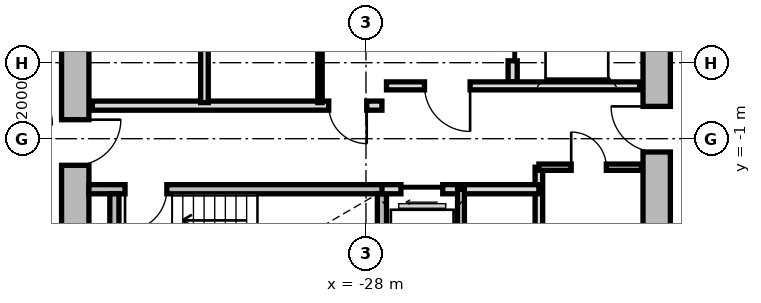
"""IFC4 building model, lengths in metres.
Left out: names, types, materials, properties, quantities, classifications, styles, units other than length and angle.
Written with IfcOpenShell. Run it as: python <this file> out.ifc"""

import sys

from ifc_helpers import new_model, si_unit, direction, frame, frame_2d, origin, place, context, subcontext, project, spatial, rectangle, extrude, source, transform, mapped, element, fill, save


model = new_model("IFC4")
c1 = context("Model", 3, precision=1e-05, world=origin(), true_north=direction((0.0, 1.0)))
c2 = subcontext(c1, "Body", "Model", "MODEL_VIEW")
j1 = project(units=[si_unit("LENGTHUNIT", "METRE"), si_unit("PLANEANGLEUNIT", "RADIAN")], contexts=[c1])
p1 = place(None, origin())
s1 = spatial("IfcSite", under=j1, at=p1, CompositionType="ELEMENT")
p2 = place(p1, origin())
s2 = spatial("IfcBuilding", under=s1, at=p2, CompositionType="ELEMENT")
p3 = place(p2, frame((0.0, 0.0, 81.0)))
s3 = spatial("IfcBuildingStorey", under=s2, at=p3, CompositionType="ELEMENT", Elevation=81.0)
m1 = source(origin(), c2, "Body", "SweptSolid", [
    extrude(rectangle(XDim=11.0, YDim=0.72, at=frame_2d((5.5, 0.0))), origin(), (0.0, 0.0, 1.0), 2.79),
])
p4 = place(p3, frame((-35.65, -5.5, 0.0), z_axis=(0.0, 0.0, 1.0), x_axis=(0.0, 1.0, 0.0)))
e1 = element("IfcWall", 1, at=p4, inside=s3, PredefinedType="SHEAR", context=c2, shape_type="MappedRepresentation", body=[
    mapped(m1, transform((0.0, 0.0, 0.0), x_axis=(1.0, 0.0, 0.0), y_axis=(0.0, 1.0, 0.0), z_axis=(0.0, 0.0, 1.0), scale=1.0)),
])
p5 = place(p4, frame((3.8, 0.0, 0.0)))
e2 = element("IfcOpeningElement", 2, at=p5, cuts=e1, PredefinedType="OPENING", context=c2, shape_type="SweptSolid", body=[
    extrude(rectangle(XDim=1.2, YDim=2.15, at=frame_2d((0.6, 1.075))), frame((0.0, 0.37, 0.0), z_axis=(0.0, -1.0, 0.0), x_axis=(1.0, 0.0, 0.0)), (0.0, 0.0, 1.0), 0.74),
])
p6 = place(p3, frame((-20.35, 5.5, 0.0), z_axis=(0.0, 0.0, 1.0), x_axis=(0.0, -1.0, 0.0)))
e3 = element("IfcWall", 3, at=p6, inside=s3, PredefinedType="SHEAR", context=c2, shape_type="MappedRepresentation", body=[
    mapped(m1, transform((0.0, 0.0, 0.0), x_axis=(1.0, 0.0, 0.0), y_axis=(0.0, 1.0, 0.0), z_axis=(0.0, 0.0, 1.0), scale=1.0)),
])
p7 = place(p6, frame((5.65, 0.0, 0.0)))
e4 = element("IfcOpeningElement", 4, at=p7, cuts=e3, PredefinedType="OPENING", context=c2, shape_type="SweptSolid", body=[
    extrude(rectangle(XDim=1.2, YDim=2.15, at=frame_2d((0.6, 1.075))), frame((0.0, 0.37, 0.0), z_axis=(0.0, -1.0, 0.0), x_axis=(1.0, 0.0, 0.0)), (0.0, 0.0, 1.0), 0.74),
])
m2 = source(origin(), c2, "Body", "SweptSolid", [
    extrude(rectangle(XDim=7.83, YDim=0.24, at=frame_2d((3.915, 0.0))), origin(), (0.0, 0.0, 1.0), 2.79),
])
p8 = place(p3, frame((-35.29, -2.33, 0.0), z_axis=(0.0, 0.0, 1.0), x_axis=(1.0, 0.0, 0.0)))
e5 = element("IfcWall", 5, at=p8, inside=s3, PredefinedType="PARTITIONING", context=c2, shape_type="MappedRepresentation", body=[
    mapped(m2, transform((0.0, 0.0, 0.0), x_axis=(1.0, 0.0, 0.0), y_axis=(0.0, 1.0, 0.0), z_axis=(0.0, 0.0, 1.0), scale=1.0)),
])
p9 = place(p8, frame((0.95, 0.0, 0.0)))
e6 = element("IfcOpeningElement", 6, at=p9, cuts=e5, PredefinedType="OPENING", context=c2, shape_type="SweptSolid", body=[
    extrude(rectangle(XDim=1.1, YDim=2.15, at=frame_2d((0.55, 1.075))), frame((0.0, 0.13, 0.0), z_axis=(0.0, -1.0, 0.0), x_axis=(1.0, 0.0, 0.0)), (0.0, 0.0, 1.0), 0.26),
])
m3 = source(origin(), c2, "Body", "SweptSolid", [
    extrude(rectangle(XDim=3.14, YDim=0.24, at=frame_2d((1.57, 0.0))), origin(), (0.0, 0.0, 1.0), 2.79),
])
for number, where, z_axis, x_axis in (
    (7, (-34.62, -5.59, 0.0), (0.0, 0.0, 1.0), (0.0, 1.0, 0.0)),
    (8, (-27.58, -5.59, 0.0), (0.0, 0.0, 1.0), (0.0, 1.0, 0.0)),
):
    element("IfcWall", number, at=place(p3, frame(where, z_axis=z_axis, x_axis=x_axis)), inside=s3, PredefinedType="PARTITIONING", context=c2, shape_type="MappedRepresentation", body=[
        mapped(m3, transform((0.0, 0.0, 0.0), x_axis=(1.0, 0.0, 0.0), y_axis=(0.0, 1.0, 0.0), z_axis=(0.0, 0.0, 1.0), scale=1.0)),
    ])
m4 = source(origin(), c2, "Body", "SweptSolid", [
    extrude(rectangle(XDim=5.0, YDim=0.24, at=frame_2d((2.5, 0.0))), origin(), (0.0, 0.0, 1.0), 2.775),
])
p10 = place(p3, frame((-24.14, 0.5, 0.0), z_axis=(0.0, 0.0, 1.0), x_axis=(0.0, 1.0, 0.0)))
e9 = element("IfcWall", 9, at=p10, inside=s3, PredefinedType="PARTITIONING", context=c2, shape_type="MappedRepresentation", body=[
    mapped(m4, transform((0.0, 0.0, 0.0), x_axis=(1.0, 0.0, 0.0), y_axis=(0.0, 1.0, 0.0), z_axis=(0.0, 0.0, 1.0), scale=1.0)),
])
p11 = place(p10, frame((3.05, 0.0, 0.0)))
e10 = element("IfcOpeningElement", 10, at=p11, cuts=e9, PredefinedType="OPENING", context=c2, shape_type="SweptSolid", body=[
    extrude(rectangle(XDim=1.3, YDim=2.2, at=frame_2d((0.65, 1.1))), frame((0.0, 0.13, 0.0), z_axis=(0.0, -1.0, 0.0), x_axis=(1.0, 0.0, 0.0)), (0.0, 0.0, 1.0), 0.26),
])
p12 = place(p10, frame((0.55, 0.0, 0.0)))
e11 = element("IfcOpeningElement", 11, at=p12, cuts=e9, PredefinedType="OPENING", context=c2, shape_type="SweptSolid", body=[
    extrude(rectangle(XDim=1.3, YDim=2.2, at=frame_2d((0.65, 1.1))), frame((0.0, 0.13, 0.0), z_axis=(0.0, -1.0, 0.0), x_axis=(1.0, 0.0, 0.0)), (0.0, 0.0, 1.0), 0.26),
])
m5 = source(origin(), c2, "Body", "SweptSolid", [
    extrude(rectangle(XDim=6.66, YDim=0.21, at=frame_2d((3.33, 0.0))), origin(), (0.0, 0.0, 1.0), 2.775),
])
p13 = place(p3, frame((-27.46, 0.39, 0.0), z_axis=(0.0, 0.0, 1.0), x_axis=(1.0, 0.0, 0.0)))
e12 = element("IfcWall", 12, at=p13, inside=s3, PredefinedType="PARTITIONING", context=c2, shape_type="MappedRepresentation", body=[
    mapped(m5, transform((0.0, 0.0, 0.0), x_axis=(1.0, 0.0, 0.0), y_axis=(0.0, 1.0, 0.0), z_axis=(0.0, 0.0, 1.0), scale=1.0)),
])
p14 = place(p13, frame((1.0, 0.0, 0.0)))
e13 = element("IfcOpeningElement", 13, at=p14, cuts=e12, PredefinedType="OPENING", context=c2, shape_type="SweptSolid", body=[
    extrude(rectangle(XDim=1.2, YDim=2.15, at=frame_2d((0.6, 1.075))), frame((0.0, 0.115, 0.0), z_axis=(0.0, -1.0, 0.0), x_axis=(1.0, 0.0, 0.0)), (0.0, 0.0, 1.0), 0.23),
])
m6 = source(origin(), c2, "Body", "SweptSolid", [
    extrude(rectangle(XDim=7.62, YDim=0.24, at=frame_2d((3.81, 0.0))), origin(), (0.0, 0.0, 1.0), 2.775),
])
p15 = place(p3, frame((-35.2, -0.13, 0.0), z_axis=(0.0, 0.0, 1.0), x_axis=(1.0, 0.0, 0.0)))
e14 = element("IfcWall", 14, at=p15, inside=s3, PredefinedType="PARTITIONING", context=c2, shape_type="MappedRepresentation", body=[
    mapped(m6, transform((0.0, 0.0, 0.0), x_axis=(1.0, 0.0, 0.0), y_axis=(0.0, 1.0, 0.0), z_axis=(0.0, 0.0, 1.0), scale=1.0)),
])
p16 = place(p15, frame((6.22, 0.0, 0.0)))
e15 = element("IfcOpeningElement", 15, at=p16, cuts=e14, PredefinedType="OPENING", context=c2, shape_type="SweptSolid", body=[
    extrude(rectangle(XDim=1.0, YDim=2.1, at=frame_2d((0.5, 1.05))), frame((0.0, 0.13, 0.0), z_axis=(0.0, -1.0, 0.0), x_axis=(1.0, 0.0, 0.0)), (0.0, 0.0, 1.0), 0.26),
])
m7 = source(origin(), c2, "Body", "SweptSolid", [
    extrude(rectangle(XDim=2.33, YDim=0.115, at=frame_2d((1.165, 0.0))), origin(), (0.0, 0.0, 1.0), 2.775),
])
p17 = place(p3, frame((-29.21, -0.05, 0.0), z_axis=(0.0, 0.0, 1.0), x_axis=(0.0, 1.0, 0.0)))
e16 = element("IfcWall", 16, at=p17, inside=s3, PredefinedType="PARTITIONING", context=c2, shape_type="MappedRepresentation", body=[
    mapped(m7, transform((0.0, 0.0, 0.0), x_axis=(1.0, 0.0, 0.0), y_axis=(0.0, 1.0, 0.0), z_axis=(0.0, 0.0, 1.0), scale=1.0)),
])
m8 = source(origin(), c2, "Body", "SweptSolid", [
    extrude(rectangle(XDim=2.33, YDim=0.2, at=frame_2d((1.165, 0.0))), origin(), (0.0, 0.0, 1.0), 2.775),
])
p18 = place(p3, frame((-32.25, -0.05, 0.0), z_axis=(0.0, 0.0, 1.0), x_axis=(0.0, 1.0, 0.0)))
e17 = element("IfcWall", 17, at=p18, inside=s3, PredefinedType="PARTITIONING", context=c2, shape_type="MappedRepresentation", body=[
    mapped(m8, transform((0.0, 0.0, 0.0), x_axis=(1.0, 0.0, 0.0), y_axis=(0.0, 1.0, 0.0), z_axis=(0.0, 0.0, 1.0), scale=1.0)),
])
m9 = source(origin(), c2, "Body", "SweptSolid", [
    extrude(rectangle(XDim=3.8, YDim=0.2, at=frame_2d((1.9, 0.0))), origin(), (0.0, 0.0, 1.0), 2.775),
])
p19 = place(p3, frame((-23.45, -5.55, 0.0), z_axis=(0.0, 0.0, 1.0), x_axis=(0.0, 1.0, 0.0)))
e18 = element("IfcWall", 18, at=p19, inside=s3, PredefinedType="PARTITIONING", context=c2, shape_type="MappedRepresentation", body=[
    mapped(m9, transform((0.0, 0.0, 0.0), x_axis=(1.0, 0.0, 0.0), y_axis=(0.0, 1.0, 0.0), z_axis=(0.0, 0.0, 1.0), scale=1.0)),
])
m10 = source(origin(), c2, "Body", "SweptSolid", [
    extrude(rectangle(XDim=4.13, YDim=0.24, at=frame_2d((2.065, 0.0))), origin(), (0.0, 0.0, 1.0), 2.775),
])
p20 = place(p3, frame((-27.58, -2.33, 0.0), z_axis=(0.0, 0.0, 1.0), x_axis=(1.0, 0.0, 0.0)))
e19 = element("IfcWall", 19, at=p20, inside=s3, PredefinedType="PARTITIONING", context=c2, shape_type="MappedRepresentation", body=[
    mapped(m10, transform((0.0, 0.0, 0.0), x_axis=(1.0, 0.0, 0.0), y_axis=(0.0, 1.0, 0.0), z_axis=(0.0, 0.0, 1.0), scale=1.0)),
])
p21 = place(p20, frame((0.5, 0.0, 0.0)))
e20 = element("IfcOpeningElement", 20, at=p21, cuts=e19, PredefinedType="OPENING", context=c2, shape_type="SweptSolid", body=[
    extrude(rectangle(XDim=1.1, YDim=2.2, at=frame_2d((0.55, 1.1))), frame((0.0, 0.13, 0.0), z_axis=(0.0, -1.0, 0.0), x_axis=(1.0, 0.0, 0.0)), (0.0, 0.0, 1.0), 0.26),
])
m11 = source(origin(), c2, "Body", "SweptSolid", [
    extrude(rectangle(XDim=3.22, YDim=0.18, at=frame_2d((1.61, 0.0))), origin(), (0.0, 0.0, 1.0), 2.775),
])
p22 = place(p3, frame((-25.5, -5.55, 0.0), z_axis=(0.0, 0.0, 1.0), x_axis=(0.0, 1.0, 0.0)))
e21 = element("IfcWall", 21, at=p22, inside=s3, PredefinedType="PARTITIONING", context=c2, shape_type="MappedRepresentation", body=[
    mapped(m11, transform((0.0, 0.0, 0.0), x_axis=(1.0, 0.0, 0.0), y_axis=(0.0, 1.0, 0.0), z_axis=(0.0, 0.0, 1.0), scale=1.0)),
])
m12 = source(origin(), c2, "Body", "SweptSolid", [
    extrude(rectangle(XDim=2.7, YDim=0.165, at=frame_2d((1.35, 0.0))), origin(), (0.0, 0.0, 1.0), 2.775),
])
p23 = place(p3, frame((-23.45, -1.75, 0.0), z_axis=(0.0, 0.0, 1.0), x_axis=(1.0, 0.0, 0.0)))
e22 = element("IfcWall", 22, at=p23, inside=s3, PredefinedType="PARTITIONING", context=c2, shape_type="MappedRepresentation", body=[
    mapped(m12, transform((0.0, 0.0, 0.0), x_axis=(1.0, 0.0, 0.0), y_axis=(0.0, 1.0, 0.0), z_axis=(0.0, 0.0, 1.0), scale=1.0)),
])
p24 = place(p23, frame((0.85, 0.0, 0.0)))
e23 = element("IfcOpeningElement", 23, at=p24, cuts=e22, PredefinedType="OPENING", context=c2, shape_type="SweptSolid", body=[
    extrude(rectangle(XDim=0.925, YDim=2.1, at=frame_2d((0.462, 1.05))), frame((0.0, 0.093, 0.0), z_axis=(0.0, -1.0, 0.0), x_axis=(1.0, 0.0, 0.0)), (0.0, 0.0, 1.0), 0.185),
])
m13 = source(origin(), c2, "Body", "SweptSolid", [
    extrude(rectangle(XDim=1.1, YDim=2.15, at=frame_2d((0.55, 1.075))), frame((0.0, 0.025, 0.0), z_axis=(0.0, -1.0, 0.0), x_axis=(1.0, 0.0, 0.0)), (0.0, 0.0, 1.0), 0.05),
])
p25 = place(p9, frame((1.1, 0.0, 0.0), z_axis=(0.0, 0.0, 1.0), x_axis=(-1.0, 0.0, 0.0)))
e24 = element("IfcDoor", 24, at=p25, inside=s3, OperationType="SINGLE_SWING_RIGHT", PredefinedType="DOOR", context=c2, shape_type="MappedRepresentation", body=[
    mapped(m13, transform((0.0, 0.0, 0.0), x_axis=(1.0, 0.0, 0.0), y_axis=(0.0, 1.0, 0.0), z_axis=(0.0, 0.0, 1.0), scale=1.0)),
])
fill(e6, e24)
m14 = source(origin(), c2, "Body", "SweptSolid", [
    extrude(rectangle(XDim=1.3, YDim=2.2, at=frame_2d((0.65, 1.1))), frame((0.0, 0.025, 0.0), z_axis=(0.0, -1.0, 0.0), x_axis=(1.0, 0.0, 0.0)), (0.0, 0.0, 1.0), 0.05),
])
p26 = place(p12, origin())
e25 = element("IfcDoor", 25, at=p26, inside=s3, OperationType="SLIDING_TO_RIGHT", PredefinedType="DOOR", context=c2, shape_type="MappedRepresentation", body=[
    mapped(m14, transform((0.0, 0.0, 0.0), x_axis=(1.0, 0.0, 0.0), y_axis=(0.0, 1.0, 0.0), z_axis=(0.0, 0.0, 1.0), scale=1.0)),
])
fill(e11, e25)
m15 = source(origin(), c2, "Body", "SweptSolid", [
    extrude(rectangle(XDim=1.2, YDim=2.15, at=frame_2d((0.6, 1.075))), frame((0.0, 0.025, 0.0), z_axis=(0.0, -1.0, 0.0), x_axis=(1.0, 0.0, 0.0)), (0.0, 0.0, 1.0), 0.05),
])
p27 = place(p14, frame((1.2, 0.0, 0.0), z_axis=(0.0, 0.0, 1.0), x_axis=(-1.0, 0.0, 0.0)))
e26 = element("IfcDoor", 26, at=p27, inside=s3, OperationType="SINGLE_SWING_LEFT", PredefinedType="DOOR", context=c2, shape_type="MappedRepresentation", body=[
    mapped(m15, transform((0.0, 0.0, 0.0), x_axis=(1.0, 0.0, 0.0), y_axis=(0.0, 1.0, 0.0), z_axis=(0.0, 0.0, 1.0), scale=1.0)),
])
fill(e13, e26)
p28 = place(p5, frame((1.2, 0.0, 0.0), z_axis=(0.0, 0.0, 1.0), x_axis=(-1.0, 0.0, 0.0)))
e27 = element("IfcDoor", 27, at=p28, inside=s3, OperationType="SINGLE_SWING_LEFT", PredefinedType="DOOR", context=c2, shape_type="MappedRepresentation", body=[
    mapped(m15, transform((0.0, 0.0, 0.0), x_axis=(1.0, 0.0, 0.0), y_axis=(0.0, 1.0, 0.0), z_axis=(0.0, 0.0, 1.0), scale=1.0)),
])
fill(e2, e27)
p29 = place(p7, frame((1.2, 0.0, 0.0), z_axis=(0.0, 0.0, 1.0), x_axis=(-1.0, 0.0, 0.0)))
e28 = element("IfcDoor", 28, at=p29, inside=s3, OperationType="SINGLE_SWING_RIGHT", PredefinedType="DOOR", context=c2, shape_type="MappedRepresentation", body=[
    mapped(m15, transform((0.0, 0.0, 0.0), x_axis=(1.0, 0.0, 0.0), y_axis=(0.0, 1.0, 0.0), z_axis=(0.0, 0.0, 1.0), scale=1.0)),
])
fill(e4, e28)
m16 = source(origin(), c2, "Body", "SweptSolid", [
    extrude(rectangle(XDim=1.0, YDim=2.1, at=frame_2d((0.5, 1.05))), frame((0.0, 0.025, 0.0), z_axis=(0.0, -1.0, 0.0), x_axis=(1.0, 0.0, 0.0)), (0.0, 0.0, 1.0), 0.05),
])
p30 = place(p16, frame((1.0, 0.0, 0.0), z_axis=(0.0, 0.0, 1.0), x_axis=(-1.0, 0.0, 0.0)))
e29 = element("IfcDoor", 29, at=p30, inside=s3, OperationType="SINGLE_SWING_LEFT", PredefinedType="DOOR", context=c2, shape_type="MappedRepresentation", body=[
    mapped(m16, transform((0.0, 0.0, 0.0), x_axis=(1.0, 0.0, 0.0), y_axis=(0.0, 1.0, 0.0), z_axis=(0.0, 0.0, 1.0), scale=1.0)),
])
fill(e15, e29)
m17 = source(origin(), c2, "Body", "SweptSolid", [
    extrude(rectangle(XDim=1.1, YDim=2.2, at=frame_2d((0.55, 1.1))), frame((0.0, 0.025, 0.0), z_axis=(0.0, -1.0, 0.0), x_axis=(1.0, 0.0, 0.0)), (0.0, 0.0, 1.0), 0.05),
])
p31 = place(p21, frame((1.1, 0.0, 0.0), z_axis=(0.0, 0.0, 1.0), x_axis=(-1.0, 0.0, 0.0)))
e30 = element("IfcDoor", 30, at=p31, inside=s3, OperationType="SLIDING_TO_LEFT", PredefinedType="DOOR", context=c2, shape_type="MappedRepresentation", body=[
    mapped(m17, transform((0.0, 0.0, 0.0), x_axis=(1.0, 0.0, 0.0), y_axis=(0.0, 1.0, 0.0), z_axis=(0.0, 0.0, 1.0), scale=1.0)),
])
fill(e20, e30)
m18 = source(origin(), c2, "Body", "SweptSolid", [
    extrude(rectangle(XDim=0.925, YDim=2.1, at=frame_2d((0.462, 1.05))), frame((0.0, 0.025, 0.0), z_axis=(0.0, -1.0, 0.0), x_axis=(1.0, 0.0, 0.0)), (0.0, 0.0, 1.0), 0.05),
])
p32 = place(p24, origin())
e31 = element("IfcDoor", 31, at=p32, inside=s3, OperationType="SINGLE_SWING_LEFT", PredefinedType="DOOR", context=c2, shape_type="MappedRepresentation", body=[
    mapped(m18, transform((0.0, 0.0, 0.0), x_axis=(1.0, 0.0, 0.0), y_axis=(0.0, 1.0, 0.0), z_axis=(0.0, 0.0, 1.0), scale=1.0)),
])
fill(e23, e31)
save(model, sys.argv[1])
